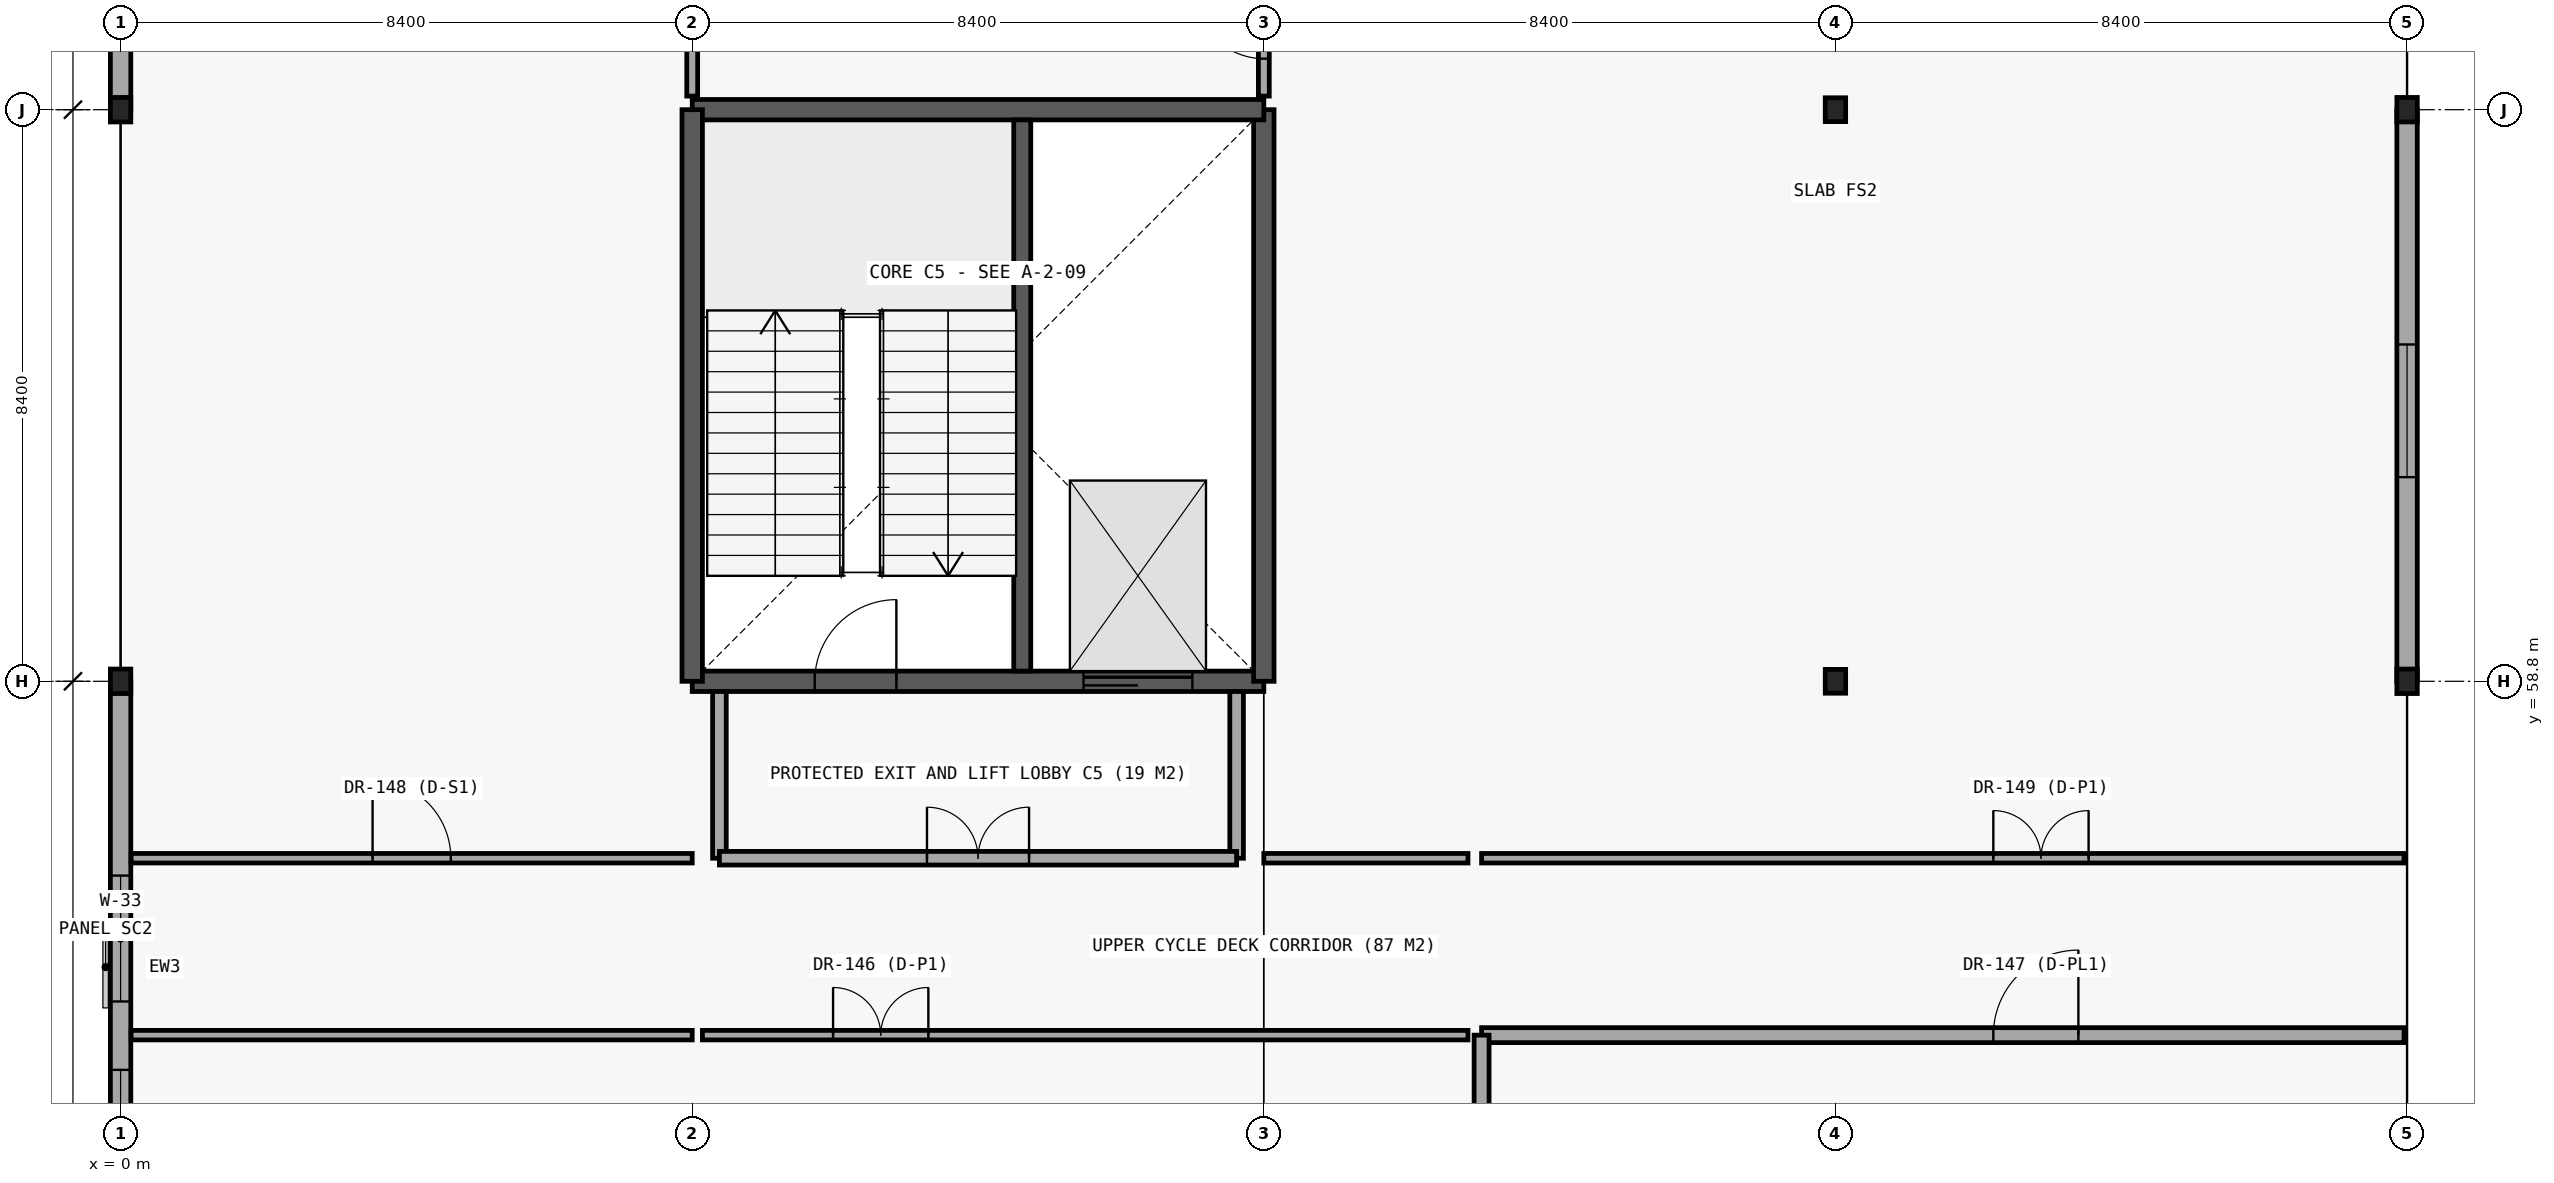
"""IFC4 building model, lengths in metres.
Left out: names, types, materials, properties, quantities, classifications, styles, units other than length and angle.
Written with IfcOpenShell. Run it as: python <this file> out.ifc"""

import sys

from ifc_helpers import new_model, si_unit, direction, frame, frame_2d, origin, origin_2d, place, context, subcontext, project, spatial, rectangle, i_section, extrude, element, fill, save


model = new_model("IFC4")
c1 = context("Model", 3, precision=1e-05, world=origin(), true_north=direction((0.0, 1.0)))
c2 = subcontext(c1, "Body", "Model", "MODEL_VIEW")
j1 = project(units=[si_unit("LENGTHUNIT", "METRE"), si_unit("PLANEANGLEUNIT", "RADIAN")], contexts=[c1])
p1 = place(None, origin())
s1 = spatial("IfcSite", under=j1, at=p1, CompositionType="ELEMENT")
p2 = place(p1, origin())
s2 = spatial("IfcBuilding", under=s1, at=p2, CompositionType="ELEMENT")
p3 = place(p2, frame((0.0, 0.0, 4.8)))
s3 = spatial("IfcBuildingStorey", under=s2, at=p3, CompositionType="ELEMENT", Elevation=4.8)
p4 = place(p3, frame((8.4, 58.8, 0.0), z_axis=(0.0, 0.0, 1.0), x_axis=(1.0, 0.0, 0.0)))
e1 = element("IfcWall", 1, at=p4, inside=s3, PredefinedType="SHEAR", context=c2, shape_type="SweptSolid", body=[
    extrude(rectangle(XDim=8.4, YDim=0.3, at=frame_2d((4.2, 0.0))), origin(), (0.0, 0.0, 1.0), 4.2),
])
p5 = place(p4, frame((1.8, 0.0, 0.0)))
e2 = element("IfcOpeningElement", 2, at=p5, cuts=e1, PredefinedType="OPENING", context=c2, shape_type="SweptSolid", body=[
    extrude(rectangle(XDim=1.2, YDim=2.2, at=frame_2d((0.6, 1.1))), frame((0.0, 0.16, 0.0), z_axis=(0.0, -1.0, 0.0), x_axis=(1.0, 0.0, 0.0)), (0.0, 0.0, 1.0), 0.32),
])
p6 = place(p4, frame((5.75, 0.0, 0.0)))
e3 = element("IfcOpeningElement", 3, at=p6, cuts=e1, PredefinedType="OPENING", context=c2, shape_type="SweptSolid", body=[
    extrude(rectangle(XDim=1.6, YDim=2.4, at=frame_2d((0.8, 1.2))), frame((0.0, 0.16, 0.0), z_axis=(0.0, -1.0, 0.0), x_axis=(1.0, 0.0, 0.0)), (0.0, 0.0, 1.0), 0.32),
])
p7 = place(p3, frame((16.8, 58.8, 0.0), z_axis=(0.0, 0.0, 1.0), x_axis=(0.0, 1.0, 0.0)))
e4 = element("IfcWall", 4, at=p7, inside=s3, PredefinedType="SHEAR", context=c2, shape_type="SweptSolid", body=[
    extrude(rectangle(XDim=8.4, YDim=0.3, at=frame_2d((4.2, 0.0))), origin(), (0.0, 0.0, 1.0), 4.2),
])
p8 = place(p3, frame((16.8, 67.2, 0.0), z_axis=(0.0, 0.0, 1.0), x_axis=(-1.0, 0.0, 0.0)))
e5 = element("IfcWall", 5, at=p8, inside=s3, PredefinedType="SHEAR", context=c2, shape_type="SweptSolid", body=[
    extrude(rectangle(XDim=8.4, YDim=0.3, at=frame_2d((4.2, 0.0))), origin(), (0.0, 0.0, 1.0), 4.2),
])
p9 = place(p3, frame((8.4, 67.2, 0.0), z_axis=(0.0, 0.0, 1.0), x_axis=(0.0, -1.0, 0.0)))
e6 = element("IfcWall", 6, at=p9, inside=s3, PredefinedType="SHEAR", context=c2, shape_type="SweptSolid", body=[
    extrude(rectangle(XDim=8.4, YDim=0.3, at=frame_2d((4.2, 0.0))), origin(), (0.0, 0.0, 1.0), 4.2),
])
p10 = place(p3, frame((13.25, 58.95, 0.0), z_axis=(0.0, 0.0, 1.0), x_axis=(0.0, 1.0, 0.0)))
e7 = element("IfcWall", 7, at=p10, inside=s3, PredefinedType="SHEAR", context=c2, shape_type="SweptSolid", body=[
    extrude(rectangle(XDim=8.1, YDim=0.25, at=frame_2d((4.05, 0.0))), origin(), (0.0, 0.0, 1.0), 4.2),
])
for number, where, z_axis, x_axis in (
    (8, (0.0, 58.8, 0.0), (0.0, 0.0, 1.0), (1.0, 0.0, 0.0)),
    (9, (0.0, 67.2, 0.0), (0.0, 0.0, 1.0), (1.0, 0.0, 0.0)),
):
    element("IfcColumn", number, at=place(p3, frame(where, z_axis=z_axis, x_axis=x_axis)), inside=s3, PredefinedType="COLUMN", context=c2, shape_type="SweptSolid", body=[
        extrude(i_section(OverallWidth=0.3, OverallDepth=0.36, WebThickness=0.012, FlangeThickness=0.022, FilletRadius=0.027, at=origin_2d()), origin(), (0.0, 0.0, 1.0), 4.2),
    ])
for number, where, z_axis, x_axis in (
    (10, (25.2, 58.8, 0.0), (0.0, 0.0, 1.0), (1.0, 0.0, 0.0)),
    (11, (25.2, 67.2, 0.0), (0.0, 0.0, 1.0), (1.0, 0.0, 0.0)),
):
    element("IfcColumn", number, at=place(p3, frame(where, z_axis=z_axis, x_axis=x_axis)), inside=s3, PredefinedType="COLUMN", context=c2, shape_type="SweptSolid", body=[
        extrude(i_section(OverallWidth=0.3, OverallDepth=0.35, WebThickness=0.01, FlangeThickness=0.018, FilletRadius=0.027, at=origin_2d()), origin(), (0.0, 0.0, 1.0), 4.2),
    ])
for number, where, z_axis, x_axis in (
    (12, (33.6, 58.8, 0.0), (0.0, 0.0, 1.0), (1.0, 0.0, 0.0)),
    (13, (33.6, 67.2, 0.0), (0.0, 0.0, 1.0), (1.0, 0.0, 0.0)),
):
    element("IfcColumn", number, at=place(p3, frame(where, z_axis=z_axis, x_axis=x_axis)), inside=s3, PredefinedType="COLUMN", context=c2, shape_type="SweptSolid", body=[
        extrude(i_section(OverallWidth=0.3, OverallDepth=0.36, WebThickness=0.012, FlangeThickness=0.022, FilletRadius=0.027, at=origin_2d()), origin(), (0.0, 0.0, 1.0), 4.2),
    ])
p11 = place(p3, frame((0.0, 58.8, 0.0), z_axis=(0.0, 0.0, 1.0), x_axis=(0.0, -1.0, 0.0)))
e14 = element("IfcWall", 14, at=p11, inside=s3, PredefinedType="STANDARD", context=c2, shape_type="SweptSolid", body=[
    extrude(rectangle(XDim=8.4, YDim=0.3, at=frame_2d((4.2, 0.0))), origin(), (0.0, 0.0, 1.0), 3.62),
])
p12 = place(p11, frame((2.855, 0.0, 0.9)))
e15 = element("IfcOpeningElement", 15, at=p12, cuts=e14, PredefinedType="OPENING", context=c2, shape_type="SweptSolid", body=[
    extrude(rectangle(XDim=1.85, YDim=2.25, at=frame_2d((0.925, 1.125))), frame((0.0, 0.16, 0.0), z_axis=(0.0, -1.0, 0.0), x_axis=(1.0, 0.0, 0.0)), (0.0, 0.0, 1.0), 0.32),
])
p13 = place(p11, frame((5.71, 0.0, 0.9)))
e16 = element("IfcOpeningElement", 16, at=p13, cuts=e14, PredefinedType="OPENING", context=c2, shape_type="SweptSolid", body=[
    extrude(rectangle(XDim=1.45, YDim=2.25, at=frame_2d((0.725, 1.125))), frame((0.0, 0.16, 0.0), z_axis=(0.0, -1.0, 0.0), x_axis=(1.0, 0.0, 0.0)), (0.0, 0.0, 1.0), 0.32),
])
p14 = place(p3, frame((0.0, 75.6, 0.0), z_axis=(0.0, 0.0, 1.0), x_axis=(0.0, -1.0, 0.0)))
e17 = element("IfcWall", 17, at=p14, inside=s3, PredefinedType="STANDARD", context=c2, shape_type="SweptSolid", body=[
    extrude(rectangle(XDim=8.4, YDim=0.3, at=frame_2d((4.2, 0.0))), origin(), (0.0, 0.0, 1.0), 3.62),
])
p15 = place(p3, frame((33.6, 58.8, 0.0), z_axis=(0.0, 0.0, 1.0), x_axis=(0.0, 1.0, 0.0)))
e18 = element("IfcWall", 18, at=p15, inside=s3, PredefinedType="STANDARD", context=c2, shape_type="SweptSolid", body=[
    extrude(rectangle(XDim=8.4, YDim=0.3, at=frame_2d((4.2, 0.0))), origin(), (0.0, 0.0, 1.0), 3.62),
])
p16 = place(p15, frame((3.0, 0.0, 2.1)))
e19 = element("IfcOpeningElement", 19, at=p16, cuts=e18, PredefinedType="OPENING", context=c2, shape_type="SweptSolid", body=[
    extrude(rectangle(XDim=1.95, YDim=1.05, at=frame_2d((0.975, 0.525))), frame((0.0, 0.16, 0.0), z_axis=(0.0, -1.0, 0.0), x_axis=(1.0, 0.0, 0.0)), (0.0, 0.0, 1.0), 0.32),
])
p17 = place(p3, frame((8.8, 56.2, 0.0), z_axis=(0.0, 0.0, 1.0), x_axis=(0.0, 1.0, 0.0)))
e20 = element("IfcWall", 20, at=p17, inside=s3, PredefinedType="PARTITIONING", context=c2, shape_type="SweptSolid", body=[
    extrude(rectangle(XDim=2.45, YDim=0.2, at=frame_2d((1.225, 0.0))), origin(), (0.0, 0.0, 1.0), 3.52),
])
p18 = place(p3, frame((16.4, 56.2, 0.0), z_axis=(0.0, 0.0, 1.0), x_axis=(0.0, 1.0, 0.0)))
e21 = element("IfcWall", 21, at=p18, inside=s3, PredefinedType="PARTITIONING", context=c2, shape_type="SweptSolid", body=[
    extrude(rectangle(XDim=2.45, YDim=0.2, at=frame_2d((1.225, 0.0))), origin(), (0.0, 0.0, 1.0), 3.5),
])
p19 = place(p3, frame((8.8, 56.2, 0.0), z_axis=(0.0, 0.0, 1.0), x_axis=(1.0, 0.0, 0.0)))
e22 = element("IfcWall", 22, at=p19, inside=s3, PredefinedType="PARTITIONING", context=c2, shape_type="SweptSolid", body=[
    extrude(rectangle(XDim=7.6, YDim=0.2, at=frame_2d((3.8, 0.0))), origin(), (0.0, 0.0, 1.0), 3.52),
])
p20 = place(p19, frame((3.05, 0.0, 0.0)))
e23 = element("IfcOpeningElement", 23, at=p20, cuts=e22, PredefinedType="OPENING", context=c2, shape_type="SweptSolid", body=[
    extrude(rectangle(XDim=1.5, YDim=2.2, at=frame_2d((0.75, 1.1))), frame((0.0, 0.11, 0.0), z_axis=(0.0, -1.0, 0.0), x_axis=(1.0, 0.0, 0.0)), (0.0, 0.0, 1.0), 0.22),
])
p21 = place(p3, frame((0.155, 53.6, 0.0), z_axis=(0.0, 0.0, 1.0), x_axis=(1.0, 0.0, 0.0)))
e24 = element("IfcWall", 24, at=p21, inside=s3, PredefinedType="PARTITIONING", context=c2, shape_type="SweptSolid", body=[
    extrude(rectangle(XDim=8.245, YDim=0.14, at=frame_2d((4.123, 0.0))), origin(), (0.0, 0.0, 1.0), 3.5),
])
p22 = place(p3, frame((8.55, 53.6, 0.0), z_axis=(0.0, 0.0, 1.0), x_axis=(1.0, 0.0, 0.0)))
e25 = element("IfcWall", 25, at=p22, inside=s3, PredefinedType="PARTITIONING", context=c2, shape_type="SweptSolid", body=[
    extrude(rectangle(XDim=11.25, YDim=0.14, at=frame_2d((5.625, 0.0))), origin(), (0.0, 0.0, 1.0), 3.5),
])
p23 = place(p22, frame((1.92, 0.0, 0.0)))
e26 = element("IfcOpeningElement", 26, at=p23, cuts=e25, PredefinedType="OPENING", context=c2, shape_type="SweptSolid", body=[
    extrude(rectangle(XDim=1.4, YDim=2.25, at=frame_2d((0.7, 1.125))), frame((0.0, 0.08, 0.0), z_axis=(0.0, -1.0, 0.0), x_axis=(1.0, 0.0, 0.0)), (0.0, 0.0, 1.0), 0.16),
])
p24 = place(p3, frame((20.0, 53.6, 0.0), z_axis=(0.0, 0.0, 1.0), x_axis=(1.0, 0.0, 0.0)))
e27 = element("IfcWall", 27, at=p24, inside=s3, PredefinedType="PARTITIONING", context=c2, shape_type="SweptSolid", body=[
    extrude(rectangle(XDim=13.555, YDim=0.22, at=frame_2d((6.777, 0.0))), origin(), (0.0, 0.0, 1.0), 3.5),
])
p25 = place(p24, frame((7.52, 0.0, 0.0)))
e28 = element("IfcOpeningElement", 28, at=p25, cuts=e27, PredefinedType="OPENING", context=c2, shape_type="SweptSolid", body=[
    extrude(rectangle(XDim=1.25, YDim=2.2, at=frame_2d((0.625, 1.1))), frame((0.0, 0.12, 0.0), z_axis=(0.0, -1.0, 0.0), x_axis=(1.0, 0.0, 0.0)), (0.0, 0.0, 1.0), 0.24),
])
p26 = place(p3, frame((0.155, 56.2, 0.0), z_axis=(0.0, 0.0, 1.0), x_axis=(1.0, 0.0, 0.0)))
e29 = element("IfcWall", 29, at=p26, inside=s3, PredefinedType="PARTITIONING", context=c2, shape_type="SweptSolid", body=[
    extrude(rectangle(XDim=8.245, YDim=0.14, at=frame_2d((4.123, 0.0))), origin(), (0.0, 0.0, 1.0), 3.5),
])
p27 = place(p26, frame((3.548, 0.0, 0.0)))
e30 = element("IfcOpeningElement", 30, at=p27, cuts=e29, PredefinedType="OPENING", context=c2, shape_type="SweptSolid", body=[
    extrude(rectangle(XDim=1.15, YDim=2.15, at=frame_2d((0.575, 1.075))), frame((0.0, 0.08, 0.0), z_axis=(0.0, -1.0, 0.0), x_axis=(1.0, 0.0, 0.0)), (0.0, 0.0, 1.0), 0.16),
])
p28 = place(p3, frame((16.8, 56.2, 0.0), z_axis=(0.0, 0.0, 1.0), x_axis=(1.0, 0.0, 0.0)))
e31 = element("IfcWall", 31, at=p28, inside=s3, PredefinedType="PARTITIONING", context=c2, shape_type="SweptSolid", body=[
    extrude(rectangle(XDim=3.0, YDim=0.14, at=frame_2d((1.5, 0.0))), origin(), (0.0, 0.0, 1.0), 3.5),
])
p29 = place(p3, frame((20.0, 56.2, 0.0), z_axis=(0.0, 0.0, 1.0), x_axis=(1.0, 0.0, 0.0)))
e32 = element("IfcWall", 32, at=p29, inside=s3, PredefinedType="PARTITIONING", context=c2, shape_type="SweptSolid", body=[
    extrude(rectangle(XDim=13.555, YDim=0.14, at=frame_2d((6.777, 0.0))), origin(), (0.0, 0.0, 1.0), 3.5),
])
p30 = place(p29, frame((7.52, 0.0, 0.0)))
e33 = element("IfcOpeningElement", 33, at=p30, cuts=e32, PredefinedType="OPENING", context=c2, shape_type="SweptSolid", body=[
    extrude(rectangle(XDim=1.4, YDim=2.25, at=frame_2d((0.7, 1.125))), frame((0.0, 0.08, 0.0), z_axis=(0.0, -1.0, 0.0), x_axis=(1.0, 0.0, 0.0)), (0.0, 0.0, 1.0), 0.16),
])
p31 = place(p3, frame((8.4, 67.4, 0.0), z_axis=(0.0, 0.0, 1.0), x_axis=(0.0, 1.0, 0.0)))
e34 = element("IfcWall", 34, at=p31, inside=s3, PredefinedType="PARTITIONING", context=c2, shape_type="SweptSolid", body=[
    extrude(rectangle(XDim=24.85, YDim=0.16, at=frame_2d((12.425, 0.0))), origin(), (0.0, 0.0, 1.0), 3.5),
])
p32 = place(p3, frame((16.8, 67.4, 0.0), z_axis=(0.0, 0.0, 1.0), x_axis=(0.0, 1.0, 0.0)))
e35 = element("IfcWall", 35, at=p32, inside=s3, PredefinedType="PARTITIONING", context=c2, shape_type="SweptSolid", body=[
    extrude(rectangle(XDim=24.85, YDim=0.16, at=frame_2d((12.425, 0.0))), origin(), (0.0, 0.0, 1.0), 3.5),
])
p33 = place(p32, frame((0.55, 0.0, 0.0)))
e36 = element("IfcOpeningElement", 36, at=p33, cuts=e35, PredefinedType="OPENING", context=c2, shape_type="SweptSolid", body=[
    extrude(rectangle(XDim=1.0, YDim=2.15, at=frame_2d((0.5, 1.075))), frame((0.0, 0.09, 0.0), z_axis=(0.0, -1.0, 0.0), x_axis=(1.0, 0.0, 0.0)), (0.0, 0.0, 1.0), 0.18),
])
p34 = place(p3, frame((20.0, 42.0, 0.0), z_axis=(0.0, 0.0, 1.0), x_axis=(0.0, 1.0, 0.0)))
e37 = element("IfcWall", 37, at=p34, inside=s3, PredefinedType="PARTITIONING", context=c2, shape_type="SweptSolid", body=[
    extrude(rectangle(XDim=11.6, YDim=0.22, at=frame_2d((5.8, 0.0))), origin(), (0.0, 0.0, 1.0), 3.5),
])
p35 = place(p12, origin())
e38 = element("IfcWindow", 38, at=p35, inside=s3, PartitioningType="SINGLE_PANEL", PredefinedType="WINDOW", context=c2, shape_type="SweptSolid", body=[
    extrude(rectangle(XDim=1.85, YDim=2.25, at=frame_2d((0.925, 1.125))), frame((0.0, 0.03, 0.0), z_axis=(0.0, -1.0, 0.0), x_axis=(1.0, 0.0, 0.0)), (0.0, 0.0, 1.0), 0.06),
])
fill(e15, e38)
p36 = place(p13, origin())
e39 = element("IfcWindow", 39, at=p36, inside=s3, PartitioningType="SINGLE_PANEL", PredefinedType="WINDOW", context=c2, shape_type="SweptSolid", body=[
    extrude(rectangle(XDim=1.45, YDim=2.25, at=frame_2d((0.725, 1.125))), frame((0.0, 0.03, 0.0), z_axis=(0.0, -1.0, 0.0), x_axis=(1.0, 0.0, 0.0)), (0.0, 0.0, 1.0), 0.06),
])
fill(e16, e39)
p37 = place(p16, origin())
e40 = element("IfcWindow", 40, at=p37, inside=s3, PartitioningType="SINGLE_PANEL", PredefinedType="WINDOW", context=c2, shape_type="SweptSolid", body=[
    extrude(rectangle(XDim=1.95, YDim=1.05, at=frame_2d((0.975, 0.525))), frame((0.0, 0.03, 0.0), z_axis=(0.0, -1.0, 0.0), x_axis=(1.0, 0.0, 0.0)), (0.0, 0.0, 1.0), 0.06),
])
fill(e19, e40)
p38 = place(p5, origin())
e41 = element("IfcDoor", 41, at=p38, inside=s3, OperationType="SINGLE_SWING_RIGHT", PredefinedType="DOOR", context=c2, shape_type="SweptSolid", body=[
    extrude(rectangle(XDim=1.2, YDim=2.2, at=frame_2d((0.6, 1.1))), frame((0.0, 0.025, 0.0), z_axis=(0.0, -1.0, 0.0), x_axis=(1.0, 0.0, 0.0)), (0.0, 0.0, 1.0), 0.05),
])
fill(e2, e41)
p39 = place(p6, origin())
e42 = element("IfcDoor", 42, at=p39, inside=s3, OperationType="SLIDING_TO_LEFT", PredefinedType="DOOR", context=c2, shape_type="SweptSolid", body=[
    extrude(rectangle(XDim=1.6, YDim=2.4, at=frame_2d((0.8, 1.2))), frame((0.0, 0.025, 0.0), z_axis=(0.0, -1.0, 0.0), x_axis=(1.0, 0.0, 0.0)), (0.0, 0.0, 1.0), 0.05),
])
fill(e3, e42)
p40 = place(p20, origin())
e43 = element("IfcDoor", 43, at=p40, inside=s3, OperationType="DOUBLE_DOOR_SINGLE_SWING", PredefinedType="DOOR", context=c2, shape_type="SweptSolid", body=[
    extrude(rectangle(XDim=1.5, YDim=2.2, at=frame_2d((0.75, 1.1))), frame((0.0, 0.025, 0.0), z_axis=(0.0, -1.0, 0.0), x_axis=(1.0, 0.0, 0.0)), (0.0, 0.0, 1.0), 0.05),
])
fill(e23, e43)
p41 = place(p23, origin())
e44 = element("IfcDoor", 44, at=p41, inside=s3, OperationType="DOUBLE_DOOR_SINGLE_SWING", PredefinedType="DOOR", context=c2, shape_type="SweptSolid", body=[
    extrude(rectangle(XDim=1.4, YDim=2.25, at=frame_2d((0.7, 1.125))), frame((0.0, 0.025, 0.0), z_axis=(0.0, -1.0, 0.0), x_axis=(1.0, 0.0, 0.0)), (0.0, 0.0, 1.0), 0.05),
])
fill(e26, e44)
p42 = place(p25, origin())
e45 = element("IfcDoor", 45, at=p42, inside=s3, OperationType="SINGLE_SWING_RIGHT", PredefinedType="DOOR", context=c2, shape_type="SweptSolid", body=[
    extrude(rectangle(XDim=1.25, YDim=2.2, at=frame_2d((0.625, 1.1))), frame((0.0, 0.025, 0.0), z_axis=(0.0, -1.0, 0.0), x_axis=(1.0, 0.0, 0.0)), (0.0, 0.0, 1.0), 0.05),
])
fill(e28, e45)
p43 = place(p27, origin())
e46 = element("IfcDoor", 46, at=p43, inside=s3, OperationType="SINGLE_SWING_LEFT", PredefinedType="DOOR", context=c2, shape_type="SweptSolid", body=[
    extrude(rectangle(XDim=1.15, YDim=2.15, at=frame_2d((0.575, 1.075))), frame((0.0, 0.025, 0.0), z_axis=(0.0, -1.0, 0.0), x_axis=(1.0, 0.0, 0.0)), (0.0, 0.0, 1.0), 0.05),
])
fill(e30, e46)
p44 = place(p30, origin())
e47 = element("IfcDoor", 47, at=p44, inside=s3, OperationType="DOUBLE_DOOR_SINGLE_SWING", PredefinedType="DOOR", context=c2, shape_type="SweptSolid", body=[
    extrude(rectangle(XDim=1.4, YDim=2.25, at=frame_2d((0.7, 1.125))), frame((0.0, 0.025, 0.0), z_axis=(0.0, -1.0, 0.0), x_axis=(1.0, 0.0, 0.0)), (0.0, 0.0, 1.0), 0.05),
])
fill(e33, e47)
p45 = place(p33, origin())
e48 = element("IfcDoor", 48, at=p45, inside=s3, OperationType="SINGLE_SWING_RIGHT", PredefinedType="DOOR", context=c2, shape_type="SweptSolid", body=[
    extrude(rectangle(XDim=1.0, YDim=2.15, at=frame_2d((0.5, 1.075))), frame((0.0, 0.025, 0.0), z_axis=(0.0, -1.0, 0.0), x_axis=(1.0, 0.0, 0.0)), (0.0, 0.0, 1.0), 0.05),
])
fill(e36, e48)
save(model, sys.argv[1])
